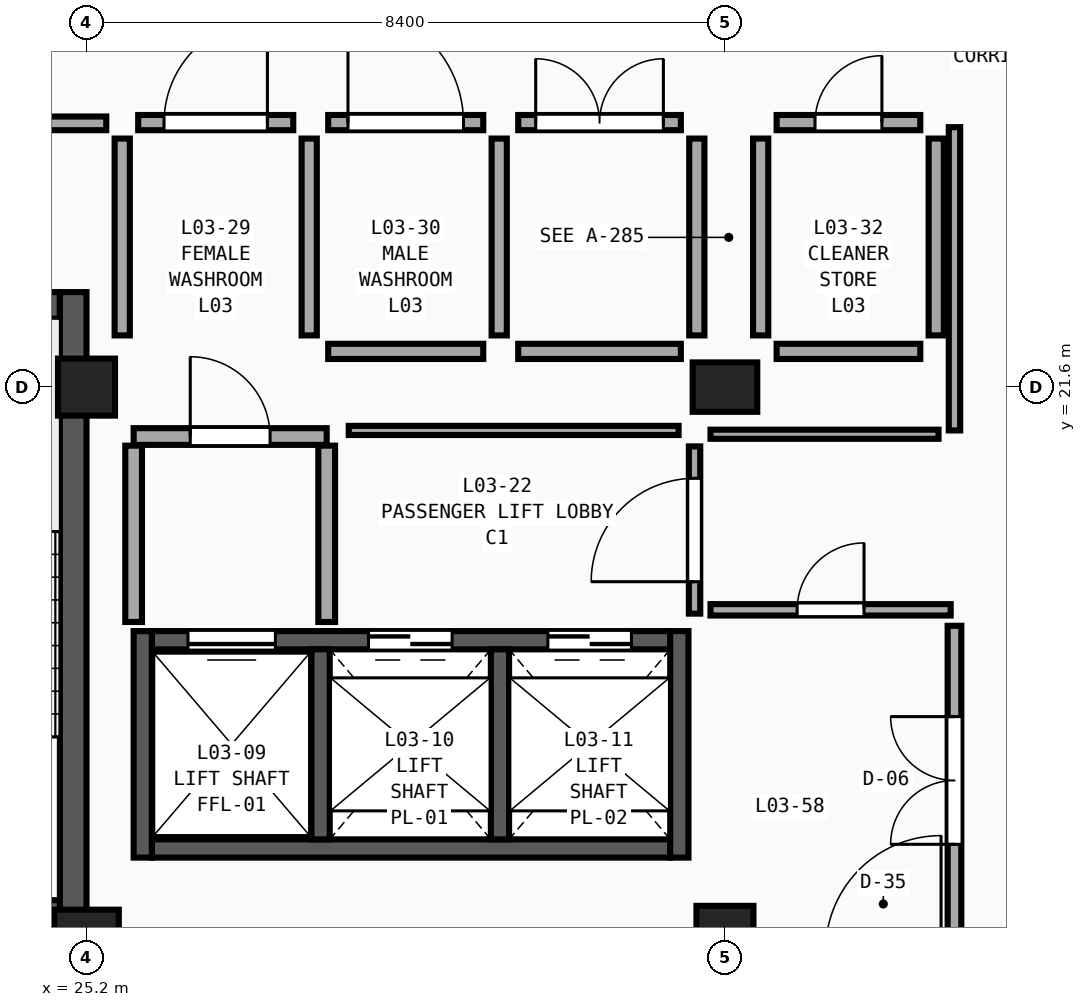
"""IFC4 building model, lengths in metres.
Left out: names, types, materials, properties, quantities, classifications, styles, units other than length and angle.
Written with IfcOpenShell. Run it as: python <this file> out.ifc"""

import sys

from ifc_helpers import new_model, si_unit, direction, frame, frame_2d, origin, origin_2d, place, context, subcontext, project, spatial, rectangle, extrude, element, fill, save


model = new_model("IFC4")
c1 = context("Model", 3, precision=1e-05, world=origin(), true_north=direction((0.0, 1.0)))
c2 = subcontext(c1, "Body", "Model", "MODEL_VIEW")
j1 = project(units=[si_unit("LENGTHUNIT", "METRE"), si_unit("PLANEANGLEUNIT", "RADIAN")], contexts=[c1])
p1 = place(None, origin())
s1 = spatial("IfcSite", under=j1, at=p1, CompositionType="ELEMENT")
p2 = place(p1, origin())
s2 = spatial("IfcBuilding", under=s1, at=p2, CompositionType="ELEMENT")
p3 = place(p2, frame((0.0, 0.0, 14.4)))
s3 = spatial("IfcBuildingStorey", under=s2, at=p3, CompositionType="ELEMENT", Elevation=14.4)
p4 = place(p3, frame((25.2, 14.4, 0.0), z_axis=(0.0, 0.0, 1.0), x_axis=(1.0, 0.0, 0.0)))
e1 = element("IfcColumn", 1, at=p4, inside=s3, PredefinedType="COLUMN", context=c2, shape_type="SweptSolid", body=[
    extrude(rectangle(XDim=0.85, YDim=0.65, at=origin_2d()), origin(), (0.0, 0.0, 1.0), 4.5),
])
for number, where, z_axis, x_axis in (
    (2, (25.2, 21.6, 0.0), (0.0, 0.0, 1.0), (1.0, 0.0, 0.0)),
    (3, (33.6, 14.4, 0.0), (0.0, 0.0, 1.0), (1.0, 0.0, 0.0)),
):
    element("IfcColumn", number, at=place(p3, frame(where, z_axis=z_axis, x_axis=x_axis)), inside=s3, PredefinedType="COLUMN", context=c2, shape_type="SweptSolid", body=[
        extrude(rectangle(XDim=0.75, YDim=0.75, at=origin_2d()), origin(), (0.0, 0.0, 1.0), 4.5),
    ])
p5 = place(p3, frame((33.6, 21.6, 0.0), z_axis=(0.0, 0.0, 1.0), x_axis=(1.0, 0.0, 0.0)))
e4 = element("IfcColumn", 4, at=p5, inside=s3, PredefinedType="COLUMN", context=c2, shape_type="SweptSolid", body=[
    extrude(rectangle(XDim=0.85, YDim=0.65, at=origin_2d()), origin(), (0.0, 0.0, 1.0), 4.5),
])
p6 = place(p3, frame((24.85, 14.675, 0.0), z_axis=(0.0, 0.0, 1.0), x_axis=(-1.0, 0.0, 0.0)))
e5 = element("IfcWall", 5, at=p6, inside=s3, PredefinedType="SHEAR", context=c2, shape_type="SweptSolid", body=[
    extrude(rectangle(XDim=7.7, YDim=0.35, at=frame_2d((3.85, 0.0))), origin(), (0.0, 0.0, 1.0), 4.5),
])
p7 = place(p6, frame((3.3, 0.0, 0.0)))
e6 = element("IfcOpeningElement", 6, at=p7, cuts=e5, PredefinedType="OPENING", context=c2, shape_type="SweptSolid", body=[
    extrude(rectangle(XDim=1.1, YDim=2.2, at=frame_2d((0.55, 1.1))), frame((0.0, 0.195, 0.0), z_axis=(0.0, -1.0, 0.0), x_axis=(1.0, 0.0, 0.0)), (0.0, 0.0, 1.0), 0.39),
])
p8 = place(p3, frame((17.15, 22.675, 0.0), z_axis=(0.0, 0.0, 1.0), x_axis=(1.0, 0.0, 0.0)))
e7 = element("IfcWall", 7, at=p8, inside=s3, PredefinedType="SHEAR", context=c2, shape_type="SweptSolid", body=[
    extrude(rectangle(XDim=7.7, YDim=0.35, at=frame_2d((3.85, 0.0))), origin(), (0.0, 0.0, 1.0), 4.5),
])
p9 = place(p3, frame((25.025, 14.5, 0.0), z_axis=(0.0, 0.0, 1.0), x_axis=(0.0, 1.0, 0.0)))
e8 = element("IfcWall", 8, at=p9, inside=s3, PredefinedType="SHEAR", context=c2, shape_type="SweptSolid", body=[
    extrude(rectangle(XDim=8.35, YDim=0.35, at=frame_2d((4.175, 0.0))), origin(), (0.0, 0.0, 1.0), 4.5),
])
p10 = place(p3, frame((32.88, 18.27, 0.0), z_axis=(0.0, 0.0, 1.0), x_axis=(-1.0, 0.0, 0.0)))
e9 = element("IfcWall", 9, at=p10, inside=s3, PredefinedType="SHEAR", context=c2, shape_type="SweptSolid", body=[
    extrude(rectangle(XDim=6.82, YDim=0.24, at=frame_2d((3.41, 0.0))), origin(), (0.0, 0.0, 1.0), 4.18),
])
p11 = place(p10, frame((5.195, 0.0, 0.0)))
e10 = element("IfcOpeningElement", 10, at=p11, cuts=e9, PredefinedType="OPENING", context=c2, shape_type="SweptSolid", body=[
    extrude(rectangle(XDim=1.15, YDim=2.25, at=frame_2d((0.575, 1.125))), frame((0.0, 0.14, 0.0), z_axis=(0.0, -1.0, 0.0), x_axis=(1.0, 0.0, 0.0)), (0.0, 0.0, 1.0), 0.28),
])
p12 = place(p10, frame((2.87, 0.0, 0.0)))
e11 = element("IfcOpeningElement", 11, at=p12, cuts=e9, PredefinedType="OPENING", context=c2, shape_type="SweptSolid", body=[
    extrude(rectangle(XDim=1.1, YDim=2.2, at=frame_2d((0.55, 1.1))), frame((0.0, 0.14, 0.0), z_axis=(0.0, -1.0, 0.0), x_axis=(1.0, 0.0, 0.0)), (0.0, 0.0, 1.0), 0.28),
])
p13 = place(p10, frame((0.51, 0.0, 0.0)))
e12 = element("IfcOpeningElement", 12, at=p13, cuts=e9, PredefinedType="OPENING", context=c2, shape_type="SweptSolid", body=[
    extrude(rectangle(XDim=1.1, YDim=2.2, at=frame_2d((0.55, 1.1))), frame((0.0, 0.14, 0.0), z_axis=(0.0, -1.0, 0.0), x_axis=(1.0, 0.0, 0.0)), (0.0, 0.0, 1.0), 0.28),
])
p14 = place(p3, frame((26.06, 15.53, 0.0), z_axis=(0.0, 0.0, 1.0), x_axis=(1.0, 0.0, 0.0)))
e13 = element("IfcWall", 13, at=p14, inside=s3, PredefinedType="SHEAR", context=c2, shape_type="SweptSolid", body=[
    extrude(rectangle(XDim=6.82, YDim=0.24, at=frame_2d((3.41, 0.0))), origin(), (0.0, 0.0, 1.0), 4.18),
])
for number, where, z_axis, x_axis in (
    (14, (25.94, 18.39, 0.0), (0.0, 0.0, 1.0), (0.0, -1.0, 0.0)),
    (15, (33.0, 15.41, 0.0), (0.0, 0.0, 1.0), (0.0, 1.0, 0.0)),
):
    element("IfcWall", number, at=place(p3, frame(where, z_axis=z_axis, x_axis=x_axis)), inside=s3, PredefinedType="SHEAR", context=c2, shape_type="SweptSolid", body=[
        extrude(rectangle(XDim=2.98, YDim=0.24, at=frame_2d((1.49, 0.0))), origin(), (0.0, 0.0, 1.0), 4.18),
    ])
for number, where, z_axis, x_axis in (
    (16, (28.28, 15.65, 0.0), (0.0, 0.0, 1.0), (0.0, 1.0, 0.0)),
    (17, (30.64, 15.65, 0.0), (0.0, 0.0, 1.0), (0.0, 1.0, 0.0)),
):
    element("IfcWall", number, at=place(p3, frame(where, z_axis=z_axis, x_axis=x_axis)), inside=s3, PredefinedType="SHEAR", context=c2, shape_type="SweptSolid", body=[
        extrude(rectangle(XDim=2.5, YDim=0.24, at=frame_2d((1.25, 0.0))), origin(), (0.0, 0.0, 1.0), 4.18),
    ])
p15 = place(p3, frame((25.82, 20.95, 0.0), z_axis=(0.0, 0.0, 1.0), x_axis=(1.0, 0.0, 0.0)))
e18 = element("IfcWall", 18, at=p15, inside=s3, PredefinedType="SOLIDWALL", context=c2, shape_type="SweptSolid", body=[
    extrude(rectangle(XDim=2.54, YDim=0.22, at=frame_2d((1.27, 0.0))), origin(), (0.0, 0.0, 1.0), 3.73),
])
p16 = place(p15, frame((0.745, 0.0, 0.0)))
e19 = element("IfcOpeningElement", 19, at=p16, cuts=e18, PredefinedType="OPENING", context=c2, shape_type="SweptSolid", body=[
    extrude(rectangle(XDim=1.05, YDim=2.15, at=frame_2d((0.525, 1.075))), frame((0.0, 0.13, 0.0), z_axis=(0.0, -1.0, 0.0), x_axis=(1.0, 0.0, 0.0)), (0.0, 0.0, 1.0), 0.26),
])
for number, where, z_axis, x_axis in (
    (20, (25.82, 18.51, 0.0), (0.0, 0.0, 1.0), (0.0, 1.0, 0.0)),
    (21, (28.36, 18.51, 0.0), (0.0, 0.0, 1.0), (0.0, 1.0, 0.0)),
):
    element("IfcWall", number, at=place(p3, frame(where, z_axis=z_axis, x_axis=x_axis)), inside=s3, PredefinedType="SOLIDWALL", context=c2, shape_type="SweptSolid", body=[
        extrude(rectangle(XDim=2.32, YDim=0.22, at=frame_2d((1.16, 0.0))), origin(), (0.0, 0.0, 1.0), 4.18),
    ])
p17 = place(p3, frame((28.65, 21.03, 0.0), z_axis=(0.0, 0.0, 1.0), x_axis=(1.0, 0.0, 0.0)))
e22 = element("IfcWall", 22, at=p17, inside=s3, PredefinedType="PARTITIONING", context=c2, shape_type="SweptSolid", body=[
    extrude(rectangle(XDim=4.34, YDim=0.12, at=frame_2d((2.17, 0.0))), origin(), (0.0, 0.0, 1.0), 3.73),
])
p18 = place(p3, frame((36.62, 14.39, 0.0), z_axis=(0.0, 0.0, 1.0), x_axis=(0.0, 1.0, 0.0)))
e23 = element("IfcWall", 23, at=p18, inside=s3, PredefinedType="PARTITIONING", context=c2, shape_type="SweptSolid", body=[
    extrude(rectangle(XDim=4.07, YDim=0.18, at=frame_2d((2.035, 0.0))), origin(), (0.0, 0.0, 1.0), 4.18),
])
p19 = place(p18, frame((1.195, 0.0, 0.0)))
e24 = element("IfcOpeningElement", 24, at=p19, cuts=e23, PredefinedType="OPENING", context=c2, shape_type="SweptSolid", body=[
    extrude(rectangle(XDim=1.68, YDim=2.05, at=frame_2d((0.84, 1.025))), frame((0.0, 0.11, 0.0), z_axis=(0.0, -1.0, 0.0), x_axis=(1.0, 0.0, 0.0)), (0.0, 0.0, 1.0), 0.22),
])
p20 = place(p3, frame((36.62, 21.03, 0.0), z_axis=(0.0, 0.0, 1.0), x_axis=(0.0, 1.0, 0.0)))
e25 = element("IfcWall", 25, at=p20, inside=s3, PredefinedType="PARTITIONING", context=c2, shape_type="SweptSolid", body=[
    extrude(rectangle(XDim=3.99, YDim=0.15, at=frame_2d((1.995, 0.0))), origin(), (0.0, 0.0, 1.0), 4.18),
])
p21 = place(p3, frame((22.24, 25.07, 0.0), z_axis=(0.0, 0.0, 1.0), x_axis=(1.0, 0.0, 0.0)))
e26 = element("IfcWall", 26, at=p21, inside=s3, PredefinedType="PARTITIONING", context=c2, shape_type="SweptSolid", body=[
    extrude(rectangle(XDim=3.22, YDim=0.18, at=frame_2d((1.61, 0.0))), origin(), (0.0, 0.0, 1.0), 4.18),
])
p22 = place(p21, frame((0.77, 0.0, 0.0)))
e27 = element("IfcOpeningElement", 27, at=p22, cuts=e26, PredefinedType="OPENING", context=c2, shape_type="SweptSolid", body=[
    extrude(rectangle(XDim=1.68, YDim=2.13, at=frame_2d((0.84, 1.065))), frame((0.0, 0.11, 0.0), z_axis=(0.0, -1.0, 0.0), x_axis=(1.0, 0.0, 0.0)), (0.0, 0.0, 1.0), 0.22),
])
p23 = place(p3, frame((33.41, 18.67, 0.0), z_axis=(0.0, 0.0, 1.0), x_axis=(1.0, 0.0, 0.0)))
e28 = element("IfcWall", 28, at=p23, inside=s3, PredefinedType="PARTITIONING", context=c2, shape_type="SweptSolid", body=[
    extrude(rectangle(XDim=3.16, YDim=0.15, at=frame_2d((1.58, 0.0))), origin(), (0.0, 0.0, 1.0), 4.18),
])
p24 = place(p23, frame((1.14, 0.0, 0.0)))
e29 = element("IfcOpeningElement", 29, at=p24, cuts=e28, PredefinedType="OPENING", context=c2, shape_type="SweptSolid", body=[
    extrude(rectangle(XDim=0.88, YDim=2.21, at=frame_2d((0.44, 1.105))), frame((0.0, 0.095, 0.0), z_axis=(0.0, -1.0, 0.0), x_axis=(1.0, 0.0, 0.0)), (0.0, 0.0, 1.0), 0.19),
])
p25 = place(p3, frame((33.41, 20.98, 0.0), z_axis=(0.0, 0.0, 1.0), x_axis=(1.0, 0.0, 0.0)))
e30 = element("IfcWall", 30, at=p25, inside=s3, PredefinedType="PARTITIONING", context=c2, shape_type="SweptSolid", body=[
    extrude(rectangle(XDim=3.0, YDim=0.12, at=frame_2d((1.5, 0.0))), origin(), (0.0, 0.0, 1.0), 3.73),
])
p26 = place(p3, frame((33.2, 18.62, 0.0), z_axis=(0.0, 0.0, 1.0), x_axis=(0.0, 1.0, 0.0)))
e31 = element("IfcWall", 31, at=p26, inside=s3, PredefinedType="PARTITIONING", context=c2, shape_type="SweptSolid", body=[
    extrude(rectangle(XDim=2.2, YDim=0.15, at=frame_2d((1.1, 0.0))), origin(), (0.0, 0.0, 1.0), 3.73),
])
p27 = place(p26, frame((0.42, 0.0, 0.0)))
e32 = element("IfcOpeningElement", 32, at=p27, cuts=e31, PredefinedType="OPENING", context=c2, shape_type="SweptSolid", body=[
    extrude(rectangle(XDim=1.36, YDim=2.37, at=frame_2d((0.68, 1.185))), frame((0.0, 0.095, 0.0), z_axis=(0.0, -1.0, 0.0), x_axis=(1.0, 0.0, 0.0)), (0.0, 0.0, 1.0), 0.19),
])
p28 = place(p3, frame((30.88, 25.08, 0.0), z_axis=(0.0, 0.0, 1.0), x_axis=(1.0, 0.0, 0.0)))
e33 = element("IfcWall", 33, at=p28, inside=s3, PredefinedType="PLUMBINGWALL", context=c2, shape_type="SweptSolid", body=[
    extrude(rectangle(XDim=2.14, YDim=0.2, at=frame_2d((1.07, 0.0))), origin(), (0.0, 0.0, 1.0), 4.18),
])
p29 = place(p28, frame((0.23, 0.0, 0.0)))
e34 = element("IfcOpeningElement", 34, at=p29, cuts=e33, PredefinedType="OPENING", context=c2, shape_type="SweptSolid", body=[
    extrude(rectangle(XDim=1.68, YDim=2.37, at=frame_2d((0.84, 1.185))), frame((0.0, 0.12, 0.0), z_axis=(0.0, -1.0, 0.0), x_axis=(1.0, 0.0, 0.0)), (0.0, 0.0, 1.0), 0.24),
])
p30 = place(p3, frame((25.88, 25.08, 0.0), z_axis=(0.0, 0.0, 1.0), x_axis=(1.0, 0.0, 0.0)))
e35 = element("IfcWall", 35, at=p30, inside=s3, PredefinedType="PLUMBINGWALL", context=c2, shape_type="SweptSolid", body=[
    extrude(rectangle(XDim=2.04, YDim=0.2, at=frame_2d((1.02, 0.0))), origin(), (0.0, 0.0, 1.0), 4.18),
])
p31 = place(p30, frame((0.34, 0.0, 0.0)))
e36 = element("IfcOpeningElement", 36, at=p31, cuts=e35, PredefinedType="OPENING", context=c2, shape_type="SweptSolid", body=[
    extrude(rectangle(XDim=1.36, YDim=2.45, at=frame_2d((0.68, 1.225))), frame((0.0, 0.12, 0.0), z_axis=(0.0, -1.0, 0.0), x_axis=(1.0, 0.0, 0.0)), (0.0, 0.0, 1.0), 0.24),
])
p32 = place(p3, frame((28.38, 25.08, 0.0), z_axis=(0.0, 0.0, 1.0), x_axis=(1.0, 0.0, 0.0)))
e37 = element("IfcWall", 37, at=p32, inside=s3, PredefinedType="PLUMBINGWALL", context=c2, shape_type="SweptSolid", body=[
    extrude(rectangle(XDim=2.04, YDim=0.2, at=frame_2d((1.02, 0.0))), origin(), (0.0, 0.0, 1.0), 4.18),
])
p33 = place(p32, frame((0.26, 0.0, 0.0)))
e38 = element("IfcOpeningElement", 38, at=p33, cuts=e37, PredefinedType="OPENING", context=c2, shape_type="SweptSolid", body=[
    extrude(rectangle(XDim=1.52, YDim=2.45, at=frame_2d((0.76, 1.225))), frame((0.0, 0.12, 0.0), z_axis=(0.0, -1.0, 0.0), x_axis=(1.0, 0.0, 0.0)), (0.0, 0.0, 1.0), 0.24),
])
p34 = place(p3, frame((34.28, 25.08, 0.0), z_axis=(0.0, 0.0, 1.0), x_axis=(1.0, 0.0, 0.0)))
e39 = element("IfcWall", 39, at=p34, inside=s3, PredefinedType="PLUMBINGWALL", context=c2, shape_type="SweptSolid", body=[
    extrude(rectangle(XDim=1.89, YDim=0.2, at=frame_2d((0.945, 0.0))), origin(), (0.0, 0.0, 1.0), 4.18),
])
p35 = place(p34, frame((0.505, 0.0, 0.0)))
e40 = element("IfcOpeningElement", 40, at=p35, cuts=e39, PredefinedType="OPENING", context=c2, shape_type="SweptSolid", body=[
    extrude(rectangle(XDim=0.88, YDim=2.13, at=frame_2d((0.44, 1.065))), frame((0.0, 0.12, 0.0), z_axis=(0.0, -1.0, 0.0), x_axis=(1.0, 0.0, 0.0)), (0.0, 0.0, 1.0), 0.24),
])
for number, where, z_axis, x_axis in (
    (41, (28.13, 22.28, 0.0), (0.0, 0.0, 1.0), (0.0, 1.0, 0.0)),
    (42, (25.67, 22.28, 0.0), (0.0, 0.0, 1.0), (0.0, 1.0, 0.0)),
    (43, (30.63, 22.28, 0.0), (0.0, 0.0, 1.0), (0.0, 1.0, 0.0)),
):
    element("IfcWall", number, at=place(p3, frame(where, z_axis=z_axis, x_axis=x_axis)), inside=s3, PredefinedType="PLUMBINGWALL", context=c2, shape_type="SweptSolid", body=[
        extrude(rectangle(XDim=2.59, YDim=0.2, at=frame_2d((1.295, 0.0))), origin(), (0.0, 0.0, 1.0), 4.18),
    ])
p36 = place(p3, frame((33.23, 22.28, 0.0), z_axis=(0.0, 0.0, 1.0), x_axis=(0.0, 1.0, 0.0)))
e44 = element("IfcWall", 44, at=p36, inside=s3, PredefinedType="PLUMBINGWALL", context=c2, shape_type="SweptSolid", body=[
    extrude(rectangle(XDim=2.59, YDim=0.2, at=frame_2d((1.295, 0.0))), origin(), (0.0, 0.0, 1.0), 3.73),
])
p37 = place(p3, frame((36.38, 22.28, 0.0), z_axis=(0.0, 0.0, 1.0), x_axis=(0.0, 1.0, 0.0)))
e45 = element("IfcWall", 45, at=p37, inside=s3, PredefinedType="PLUMBINGWALL", context=c2, shape_type="SweptSolid", body=[
    extrude(rectangle(XDim=2.59, YDim=0.2, at=frame_2d((1.295, 0.0))), origin(), (0.0, 0.0, 1.0), 4.18),
])
p38 = place(p3, frame((34.07, 22.28, 0.0), z_axis=(0.0, 0.0, 1.0), x_axis=(0.0, 1.0, 0.0)))
e46 = element("IfcWall", 46, at=p38, inside=s3, PredefinedType="PLUMBINGWALL", context=c2, shape_type="SweptSolid", body=[
    extrude(rectangle(XDim=2.59, YDim=0.2, at=frame_2d((1.295, 0.0))), origin(), (0.0, 0.0, 1.0), 3.73),
])
p39 = place(p3, frame((30.88, 22.07, 0.0), z_axis=(0.0, 0.0, 1.0), x_axis=(1.0, 0.0, 0.0)))
e47 = element("IfcWall", 47, at=p39, inside=s3, PredefinedType="PLUMBINGWALL", context=c2, shape_type="SweptSolid", body=[
    extrude(rectangle(XDim=2.14, YDim=0.2, at=frame_2d((1.07, 0.0))), origin(), (0.0, 0.0, 1.0), 3.73),
])
p40 = place(p3, frame((28.38, 22.07, 0.0), z_axis=(0.0, 0.0, 1.0), x_axis=(1.0, 0.0, 0.0)))
e48 = element("IfcWall", 48, at=p40, inside=s3, PredefinedType="PLUMBINGWALL", context=c2, shape_type="SweptSolid", body=[
    extrude(rectangle(XDim=2.04, YDim=0.2, at=frame_2d((1.02, 0.0))), origin(), (0.0, 0.0, 1.0), 3.73),
])
p41 = place(p3, frame((34.28, 22.07, 0.0), z_axis=(0.0, 0.0, 1.0), x_axis=(1.0, 0.0, 0.0)))
e49 = element("IfcWall", 49, at=p41, inside=s3, PredefinedType="PLUMBINGWALL", context=c2, shape_type="SweptSolid", body=[
    extrude(rectangle(XDim=1.89, YDim=0.2, at=frame_2d((0.945, 0.0))), origin(), (0.0, 0.0, 1.0), 3.73),
])
p42 = place(p11, origin())
e50 = element("IfcDoor", 50, at=p42, inside=s3, OperationType="SLIDING_TO_LEFT", PredefinedType="DOOR", context=c2, shape_type="SweptSolid", body=[
    extrude(rectangle(XDim=1.15, YDim=2.25, at=frame_2d((0.575, 1.125))), frame((0.0, 0.025, 0.0), z_axis=(0.0, -1.0, 0.0), x_axis=(1.0, 0.0, 0.0)), (0.0, 0.0, 1.0), 0.05),
])
fill(e10, e50)
p43 = place(p12, origin())
e51 = element("IfcDoor", 51, at=p43, inside=s3, OperationType="DOUBLE_DOOR_SLIDING", PredefinedType="DOOR", context=c2, shape_type="SweptSolid", body=[
    extrude(rectangle(XDim=1.1, YDim=2.2, at=frame_2d((0.55, 1.1))), frame((0.0, 0.025, 0.0), z_axis=(0.0, -1.0, 0.0), x_axis=(1.0, 0.0, 0.0)), (0.0, 0.0, 1.0), 0.05),
])
fill(e11, e51)
p44 = place(p13, origin())
e52 = element("IfcDoor", 52, at=p44, inside=s3, OperationType="DOUBLE_DOOR_SLIDING", PredefinedType="DOOR", context=c2, shape_type="SweptSolid", body=[
    extrude(rectangle(XDim=1.1, YDim=2.2, at=frame_2d((0.55, 1.1))), frame((0.0, 0.025, 0.0), z_axis=(0.0, -1.0, 0.0), x_axis=(1.0, 0.0, 0.0)), (0.0, 0.0, 1.0), 0.05),
])
fill(e12, e52)
p45 = place(p16, origin())
e53 = element("IfcDoor", 53, at=p45, inside=s3, OperationType="SINGLE_SWING_LEFT", PredefinedType="DOOR", context=c2, shape_type="SweptSolid", body=[
    extrude(rectangle(XDim=1.05, YDim=2.15, at=frame_2d((0.525, 1.075))), frame((0.0, 0.025, 0.0), z_axis=(0.0, -1.0, 0.0), x_axis=(1.0, 0.0, 0.0)), (0.0, 0.0, 1.0), 0.05),
])
fill(e19, e53)
p46 = place(p19, origin())
e54 = element("IfcDoor", 54, at=p46, inside=s3, OperationType="DOUBLE_DOOR_SINGLE_SWING", PredefinedType="DOOR", context=c2, shape_type="SweptSolid", body=[
    extrude(rectangle(XDim=1.68, YDim=2.05, at=frame_2d((0.84, 1.025))), frame((0.0, 0.025, 0.0), z_axis=(0.0, -1.0, 0.0), x_axis=(1.0, 0.0, 0.0)), (0.0, 0.0, 1.0), 0.05),
])
fill(e24, e54)
p47 = place(p24, origin())
e55 = element("IfcDoor", 55, at=p47, inside=s3, OperationType="SINGLE_SWING_RIGHT", PredefinedType="DOOR", context=c2, shape_type="SweptSolid", body=[
    extrude(rectangle(XDim=0.88, YDim=2.21, at=frame_2d((0.44, 1.105))), frame((0.0, 0.025, 0.0), z_axis=(0.0, -1.0, 0.0), x_axis=(1.0, 0.0, 0.0)), (0.0, 0.0, 1.0), 0.05),
])
fill(e29, e55)
p48 = place(p27, origin())
e56 = element("IfcDoor", 56, at=p48, inside=s3, OperationType="SINGLE_SWING_LEFT", PredefinedType="DOOR", context=c2, shape_type="SweptSolid", body=[
    extrude(rectangle(XDim=1.36, YDim=2.37, at=frame_2d((0.68, 1.185))), frame((0.0, 0.025, 0.0), z_axis=(0.0, -1.0, 0.0), x_axis=(1.0, 0.0, 0.0)), (0.0, 0.0, 1.0), 0.05),
])
fill(e32, e56)
p49 = place(p29, origin())
e57 = element("IfcDoor", 57, at=p49, inside=s3, OperationType="DOUBLE_DOOR_SINGLE_SWING", PredefinedType="DOOR", context=c2, shape_type="SweptSolid", body=[
    extrude(rectangle(XDim=1.68, YDim=2.37, at=frame_2d((0.84, 1.185))), frame((0.0, 0.025, 0.0), z_axis=(0.0, -1.0, 0.0), x_axis=(1.0, 0.0, 0.0)), (0.0, 0.0, 1.0), 0.05),
])
fill(e34, e57)
p50 = place(p31, origin())
e58 = element("IfcDoor", 58, at=p50, inside=s3, OperationType="SINGLE_SWING_RIGHT", PredefinedType="DOOR", context=c2, shape_type="SweptSolid", body=[
    extrude(rectangle(XDim=1.36, YDim=2.45, at=frame_2d((0.68, 1.225))), frame((0.0, 0.025, 0.0), z_axis=(0.0, -1.0, 0.0), x_axis=(1.0, 0.0, 0.0)), (0.0, 0.0, 1.0), 0.05),
])
fill(e36, e58)
p51 = place(p33, origin())
e59 = element("IfcDoor", 59, at=p51, inside=s3, OperationType="SINGLE_SWING_LEFT", PredefinedType="DOOR", context=c2, shape_type="SweptSolid", body=[
    extrude(rectangle(XDim=1.52, YDim=2.45, at=frame_2d((0.76, 1.225))), frame((0.0, 0.025, 0.0), z_axis=(0.0, -1.0, 0.0), x_axis=(1.0, 0.0, 0.0)), (0.0, 0.0, 1.0), 0.05),
])
fill(e38, e59)
p52 = place(p35, origin())
e60 = element("IfcDoor", 60, at=p52, inside=s3, OperationType="SINGLE_SWING_RIGHT", PredefinedType="DOOR", context=c2, shape_type="SweptSolid", body=[
    extrude(rectangle(XDim=0.88, YDim=2.13, at=frame_2d((0.44, 1.065))), frame((0.0, 0.025, 0.0), z_axis=(0.0, -1.0, 0.0), x_axis=(1.0, 0.0, 0.0)), (0.0, 0.0, 1.0), 0.05),
])
fill(e40, e60)
save(model, sys.argv[1])
